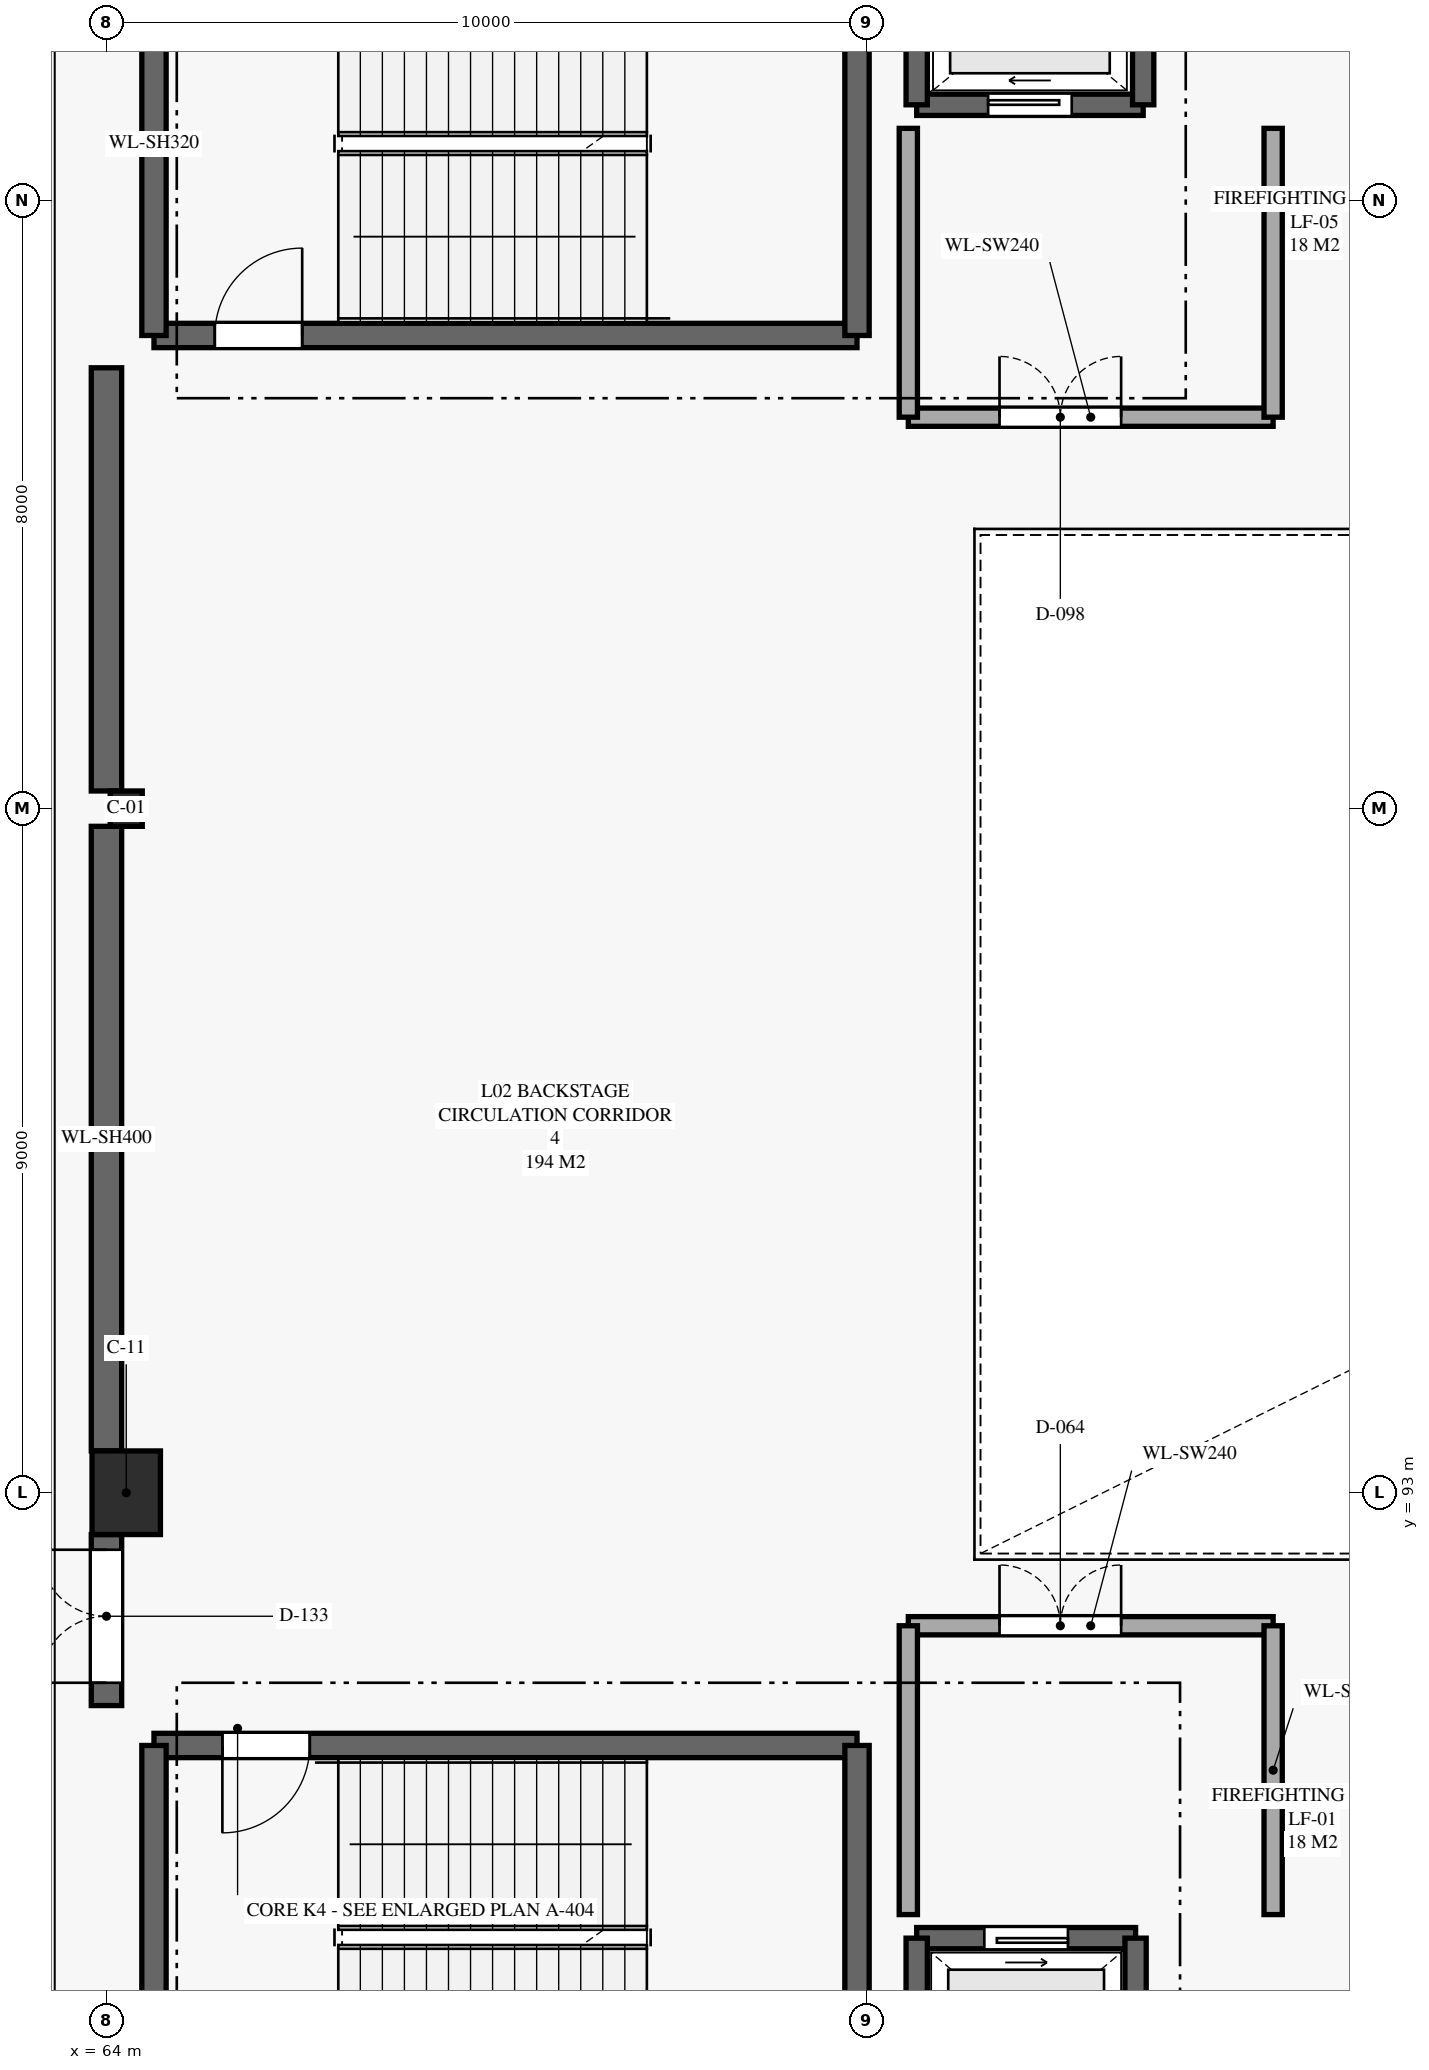
"""IFC4 building model, lengths in metres.
Left out: names, types, materials, properties, quantities, classifications, styles, units other than length and angle.
Written with IfcOpenShell. Run it as: python <this file> out.ifc"""

import sys

from ifc_helpers import new_model, si_unit, direction, frame, frame_2d, origin, origin_2d, place, context, subcontext, project, spatial, rectangle, i_section, extrude, element, fill, save


model = new_model("IFC4")
c1 = context("Model", 3, precision=1e-05, world=origin(), true_north=direction((0.0, 1.0)))
c2 = subcontext(c1, "Body", "Model", "MODEL_VIEW")
j1 = project(units=[si_unit("LENGTHUNIT", "METRE"), si_unit("PLANEANGLEUNIT", "RADIAN")], contexts=[c1])
p1 = place(None, origin())
s1 = spatial("IfcSite", under=j1, at=p1, CompositionType="ELEMENT")
p2 = place(p1, origin())
s2 = spatial("IfcBuilding", under=s1, at=p2, CompositionType="ELEMENT")
p3 = place(p2, frame((0.0, 0.0, 10.0)))
s3 = spatial("IfcBuildingStorey", under=s2, at=p3, CompositionType="ELEMENT", Elevation=10.0)
p4 = place(p3, frame((64.26, 93.0, 0.0), z_axis=(0.0, 0.0, 1.0), x_axis=(1.0, 0.0, 0.0)))
e1 = element("IfcColumn", 1, at=p4, inside=s3, PredefinedType="COLUMN", context=c2, shape_type="SweptSolid", body=[
    extrude(rectangle(XDim=0.9, YDim=1.1, at=origin_2d()), origin(), (0.0, 0.0, 1.0), 5.0),
])
p5 = place(p3, frame((64.26, 102.0, 0.0), z_axis=(0.0, 0.0, 1.0), x_axis=(1.0, 0.0, 0.0)))
e2 = element("IfcColumn", 2, at=p5, inside=s3, PredefinedType="COLUMN", context=c2, shape_type="SweptSolid", body=[
    extrude(i_section(OverallWidth=0.422, OverallDepth=0.465, WebThickness=0.045, FlangeThickness=0.073, FilletRadius=0.02, at=origin_2d()), origin(), (0.0, 0.0, 1.0), 5.0),
])
p6 = place(p3, frame((64.625, 108.225, 0.0), z_axis=(0.0, 0.0, 1.0), x_axis=(1.0, 0.0, 0.0)))
e3 = element("IfcWall", 3, at=p6, inside=s3, PredefinedType="SHEAR", context=c2, shape_type="SweptSolid", body=[
    extrude(rectangle(XDim=9.25, YDim=0.32, at=frame_2d((4.625, 0.0))), origin(), (0.0, 0.0, 1.0), 4.675),
])
p7 = place(p6, frame((0.8, 0.0, 0.0)))
e4 = element("IfcOpeningElement", 4, at=p7, cuts=e3, PredefinedType="OPENING", context=c2, shape_type="SweptSolid", body=[
    extrude(rectangle(XDim=1.15, YDim=2.2, at=frame_2d((0.575, 1.1))), frame((0.0, 0.17, 0.0), z_axis=(0.0, -1.0, 0.0), x_axis=(1.0, 0.0, 0.0)), (0.0, 0.0, 1.0), 0.34),
])
for number, where, z_axis, x_axis in (
    (5, (64.625, 113.275, 0.0), (0.0, 0.0, 1.0), (0.0, -1.0, 0.0)),
    (6, (73.875, 108.225, 0.0), (0.0, 0.0, 1.0), (0.0, 1.0, 0.0)),
):
    element("IfcWall", number, at=place(p3, frame(where, z_axis=z_axis, x_axis=x_axis)), inside=s3, PredefinedType="SHEAR", context=c2, shape_type="SweptSolid", body=[
        extrude(rectangle(XDim=5.05, YDim=0.32, at=frame_2d((2.525, 0.0))), origin(), (0.0, 0.0, 1.0), 4.675),
    ])
p8 = place(p3, frame((73.875, 89.675, 0.0), z_axis=(0.0, 0.0, 1.0), x_axis=(-1.0, 0.0, 0.0)))
e7 = element("IfcWall", 7, at=p8, inside=s3, PredefinedType="SHEAR", context=c2, shape_type="SweptSolid", body=[
    extrude(rectangle(XDim=9.25, YDim=0.32, at=frame_2d((4.625, 0.0))), origin(), (0.0, 0.0, 1.0), 4.675),
])
p9 = place(p8, frame((7.2, 0.0, 0.0)))
e8 = element("IfcOpeningElement", 8, at=p9, cuts=e7, PredefinedType="OPENING", context=c2, shape_type="SweptSolid", body=[
    extrude(rectangle(XDim=1.15, YDim=2.2, at=frame_2d((0.575, 1.1))), frame((0.0, 0.17, 0.0), z_axis=(0.0, -1.0, 0.0), x_axis=(1.0, 0.0, 0.0)), (0.0, 0.0, 1.0), 0.34),
])
for number, where, z_axis, x_axis in (
    (9, (64.625, 89.675, 0.0), (0.0, 0.0, 1.0), (0.0, -1.0, 0.0)),
    (10, (73.875, 84.625, 0.0), (0.0, 0.0, 1.0), (0.0, 1.0, 0.0)),
):
    element("IfcWall", number, at=place(p3, frame(where, z_axis=z_axis, x_axis=x_axis)), inside=s3, PredefinedType="SHEAR", context=c2, shape_type="SweptSolid", body=[
        extrude(rectangle(XDim=5.05, YDim=0.32, at=frame_2d((2.525, 0.0))), origin(), (0.0, 0.0, 1.0), 4.675),
    ])
p10 = place(p3, frame((77.54, 87.14, 0.0), z_axis=(0.0, 0.0, 1.0), x_axis=(-1.0, 0.0, 0.0)))
e11 = element("IfcWall", 11, at=p10, inside=s3, PredefinedType="SHEAR", context=c2, shape_type="SweptSolid", body=[
    extrude(rectangle(XDim=2.88, YDim=0.28, at=frame_2d((1.44, 0.0))), origin(), (0.0, 0.0, 1.0), 4.675),
])
p11 = place(p10, frame((0.89, 0.0, 0.0)))
e12 = element("IfcOpeningElement", 12, at=p11, cuts=e11, PredefinedType="OPENING", context=c2, shape_type="SweptSolid", body=[
    extrude(rectangle(XDim=1.1, YDim=2.2, at=frame_2d((0.55, 1.1))), frame((0.0, 0.15, 0.0), z_axis=(0.0, -1.0, 0.0), x_axis=(1.0, 0.0, 0.0)), (0.0, 0.0, 1.0), 0.3),
])
for number, where, z_axis, x_axis in (
    (13, (74.66, 87.14, 0.0), (0.0, 0.0, 1.0), (0.0, -1.0, 0.0)),
    (14, (77.54, 84.66, 0.0), (0.0, 0.0, 1.0), (0.0, 1.0, 0.0)),
):
    element("IfcWall", number, at=place(p3, frame(where, z_axis=z_axis, x_axis=x_axis)), inside=s3, PredefinedType="SHEAR", context=c2, shape_type="SweptSolid", body=[
        extrude(rectangle(XDim=2.48, YDim=0.28, at=frame_2d((1.24, 0.0))), origin(), (0.0, 0.0, 1.0), 4.675),
    ])
p12 = place(p3, frame((74.55, 91.25, 0.0), z_axis=(0.0, 0.0, 1.0), x_axis=(1.0, 0.0, 0.0)))
e15 = element("IfcWall", 15, at=p12, inside=s3, PredefinedType="SOLIDWALL", context=c2, shape_type="SweptSolid", body=[
    extrude(rectangle(XDim=4.8, YDim=0.24, at=frame_2d((2.4, 0.0))), origin(), (0.0, 0.0, 1.0), 4.675),
])
p13 = place(p12, frame((1.2, 0.0, 0.0)))
e16 = element("IfcOpeningElement", 16, at=p13, cuts=e15, PredefinedType="OPENING", context=c2, shape_type="SweptSolid", body=[
    extrude(rectangle(XDim=1.6, YDim=2.2, at=frame_2d((0.8, 1.1))), frame((0.0, 0.13, 0.0), z_axis=(0.0, -1.0, 0.0), x_axis=(1.0, 0.0, 0.0)), (0.0, 0.0, 1.0), 0.26),
])
for number, where, z_axis, x_axis in (
    (17, (74.55, 91.25, 0.0), (0.0, 0.0, 1.0), (0.0, -1.0, 0.0)),
    (18, (79.35, 87.45, 0.0), (0.0, 0.0, 1.0), (0.0, 1.0, 0.0)),
):
    element("IfcWall", number, at=place(p3, frame(where, z_axis=z_axis, x_axis=x_axis)), inside=s3, PredefinedType="SOLIDWALL", context=c2, shape_type="SweptSolid", body=[
        extrude(rectangle(XDim=3.8, YDim=0.24, at=frame_2d((1.9, 0.0))), origin(), (0.0, 0.0, 1.0), 4.675),
    ])
p14 = place(p3, frame((74.66, 111.26, 0.0), z_axis=(0.0, 0.0, 1.0), x_axis=(1.0, 0.0, 0.0)))
e19 = element("IfcWall", 19, at=p14, inside=s3, PredefinedType="SHEAR", context=c2, shape_type="SweptSolid", body=[
    extrude(rectangle(XDim=2.98, YDim=0.28, at=frame_2d((1.49, 0.0))), origin(), (0.0, 0.0, 1.0), 4.675),
])
p15 = place(p14, frame((0.94, 0.0, 0.0)))
e20 = element("IfcOpeningElement", 20, at=p15, cuts=e19, PredefinedType="OPENING", context=c2, shape_type="SweptSolid", body=[
    extrude(rectangle(XDim=1.1, YDim=2.2, at=frame_2d((0.55, 1.1))), frame((0.0, 0.15, 0.0), z_axis=(0.0, -1.0, 0.0), x_axis=(1.0, 0.0, 0.0)), (0.0, 0.0, 1.0), 0.3),
])
for number, where, z_axis, x_axis in (
    (21, (74.66, 113.74, 0.0), (0.0, 0.0, 1.0), (0.0, -1.0, 0.0)),
    (22, (77.64, 111.26, 0.0), (0.0, 0.0, 1.0), (0.0, 1.0, 0.0)),
):
    element("IfcWall", number, at=place(p3, frame(where, z_axis=z_axis, x_axis=x_axis)), inside=s3, PredefinedType="SHEAR", context=c2, shape_type="SweptSolid", body=[
        extrude(rectangle(XDim=2.48, YDim=0.28, at=frame_2d((1.24, 0.0))), origin(), (0.0, 0.0, 1.0), 4.675),
    ])
p16 = place(p3, frame((74.55, 107.15, 0.0), z_axis=(0.0, 0.0, 1.0), x_axis=(1.0, 0.0, 0.0)))
e23 = element("IfcWall", 23, at=p16, inside=s3, PredefinedType="SOLIDWALL", context=c2, shape_type="SweptSolid", body=[
    extrude(rectangle(XDim=4.8, YDim=0.24, at=frame_2d((2.4, 0.0))), origin(), (0.0, 0.0, 1.0), 4.675),
])
p17 = place(p16, frame((1.2, 0.0, 0.0)))
e24 = element("IfcOpeningElement", 24, at=p17, cuts=e23, PredefinedType="OPENING", context=c2, shape_type="SweptSolid", body=[
    extrude(rectangle(XDim=1.6, YDim=2.2, at=frame_2d((0.8, 1.1))), frame((0.0, 0.13, 0.0), z_axis=(0.0, -1.0, 0.0), x_axis=(1.0, 0.0, 0.0)), (0.0, 0.0, 1.0), 0.26),
])
for number, where, z_axis, x_axis in (
    (25, (74.55, 110.95, 0.0), (0.0, 0.0, 1.0), (0.0, -1.0, 0.0)),
    (26, (79.35, 107.15, 0.0), (0.0, 0.0, 1.0), (0.0, 1.0, 0.0)),
):
    element("IfcWall", number, at=place(p3, frame(where, z_axis=z_axis, x_axis=x_axis)), inside=s3, PredefinedType="SOLIDWALL", context=c2, shape_type="SweptSolid", body=[
        extrude(rectangle(XDim=3.8, YDim=0.24, at=frame_2d((1.9, 0.0))), origin(), (0.0, 0.0, 1.0), 4.675),
    ])
p18 = place(p3, frame((64.0, 90.2, 0.0), z_axis=(0.0, 0.0, 1.0), x_axis=(0.0, 1.0, 0.0)))
e27 = element("IfcWall", 27, at=p18, inside=s3, PredefinedType="SHEAR", context=c2, shape_type="SweptSolid", body=[
    extrude(rectangle(XDim=2.25, YDim=0.4, at=frame_2d((1.125, 0.0))), origin(), (0.0, 0.0, 1.0), 4.675),
])
p19 = place(p18, frame((0.3, 0.0, 0.0)))
e28 = element("IfcOpeningElement", 28, at=p19, cuts=e27, PredefinedType="OPENING", context=c2, shape_type="SweptSolid", body=[
    extrude(rectangle(XDim=1.75, YDim=2.2, at=frame_2d((0.875, 1.1))), frame((0.0, 0.21, 0.0), z_axis=(0.0, -1.0, 0.0), x_axis=(1.0, 0.0, 0.0)), (0.0, 0.0, 1.0), 0.42),
])
p20 = place(p3, frame((64.0, 93.55, 0.0), z_axis=(0.0, 0.0, 1.0), x_axis=(0.0, 1.0, 0.0)))
e29 = element("IfcWall", 29, at=p20, inside=s3, PredefinedType="SHEAR", context=c2, shape_type="SweptSolid", body=[
    extrude(rectangle(XDim=8.218, YDim=0.4, at=frame_2d((4.109, 0.0))), origin(), (0.0, 0.0, 1.0), 4.675),
])
p21 = place(p3, frame((64.0, 102.232, 0.0), z_axis=(0.0, 0.0, 1.0), x_axis=(0.0, 1.0, 0.0)))
e30 = element("IfcWall", 30, at=p21, inside=s3, PredefinedType="SHEAR", context=c2, shape_type="SweptSolid", body=[
    extrude(rectangle(XDim=5.568, YDim=0.4, at=frame_2d((2.784, 0.0))), origin(), (0.0, 0.0, 1.0), 4.675),
])
p22 = place(p7, origin())
e31 = element("IfcDoor", 31, at=p22, inside=s3, OperationType="SINGLE_SWING_RIGHT", PredefinedType="DOOR", context=c2, shape_type="SweptSolid", body=[
    extrude(rectangle(XDim=1.15, YDim=2.2, at=frame_2d((0.575, 1.1))), frame((0.0, 0.025, 0.0), z_axis=(0.0, -1.0, 0.0), x_axis=(1.0, 0.0, 0.0)), (0.0, 0.0, 1.0), 0.05),
])
fill(e4, e31)
p23 = place(p9, origin())
e32 = element("IfcDoor", 32, at=p23, inside=s3, OperationType="SINGLE_SWING_RIGHT", PredefinedType="DOOR", context=c2, shape_type="SweptSolid", body=[
    extrude(rectangle(XDim=1.15, YDim=2.2, at=frame_2d((0.575, 1.1))), frame((0.0, 0.025, 0.0), z_axis=(0.0, -1.0, 0.0), x_axis=(1.0, 0.0, 0.0)), (0.0, 0.0, 1.0), 0.05),
])
fill(e8, e32)
p24 = place(p11, origin())
e33 = element("IfcDoor", 33, at=p24, inside=s3, OperationType="SLIDING_TO_LEFT", PredefinedType="DOOR", context=c2, shape_type="SweptSolid", body=[
    extrude(rectangle(XDim=1.1, YDim=2.2, at=frame_2d((0.55, 1.1))), frame((0.0, 0.025, 0.0), z_axis=(0.0, -1.0, 0.0), x_axis=(1.0, 0.0, 0.0)), (0.0, 0.0, 1.0), 0.05),
])
fill(e12, e33)
p25 = place(p13, origin())
e34 = element("IfcDoor", 34, at=p25, inside=s3, OperationType="DOUBLE_DOOR_SINGLE_SWING", PredefinedType="DOOR", context=c2, shape_type="SweptSolid", body=[
    extrude(rectangle(XDim=1.6, YDim=2.2, at=frame_2d((0.8, 1.1))), frame((0.0, 0.025, 0.0), z_axis=(0.0, -1.0, 0.0), x_axis=(1.0, 0.0, 0.0)), (0.0, 0.0, 1.0), 0.05),
])
fill(e16, e34)
p26 = place(p15, origin())
e35 = element("IfcDoor", 35, at=p26, inside=s3, OperationType="SLIDING_TO_LEFT", PredefinedType="DOOR", context=c2, shape_type="SweptSolid", body=[
    extrude(rectangle(XDim=1.1, YDim=2.2, at=frame_2d((0.55, 1.1))), frame((0.0, 0.025, 0.0), z_axis=(0.0, -1.0, 0.0), x_axis=(1.0, 0.0, 0.0)), (0.0, 0.0, 1.0), 0.05),
])
fill(e20, e35)
p27 = place(p17, origin())
e36 = element("IfcDoor", 36, at=p27, inside=s3, OperationType="DOUBLE_DOOR_SINGLE_SWING", PredefinedType="DOOR", context=c2, shape_type="SweptSolid", body=[
    extrude(rectangle(XDim=1.6, YDim=2.2, at=frame_2d((0.8, 1.1))), frame((0.0, 0.025, 0.0), z_axis=(0.0, -1.0, 0.0), x_axis=(1.0, 0.0, 0.0)), (0.0, 0.0, 1.0), 0.05),
])
fill(e24, e36)
p28 = place(p19, origin())
e37 = element("IfcDoor", 37, at=p28, inside=s3, OperationType="DOUBLE_DOOR_SINGLE_SWING", PredefinedType="DOOR", context=c2, shape_type="SweptSolid", body=[
    extrude(rectangle(XDim=1.75, YDim=2.2, at=frame_2d((0.875, 1.1))), frame((0.0, 0.025, 0.0), z_axis=(0.0, -1.0, 0.0), x_axis=(1.0, 0.0, 0.0)), (0.0, 0.0, 1.0), 0.05),
])
fill(e28, e37)
save(model, sys.argv[1])
